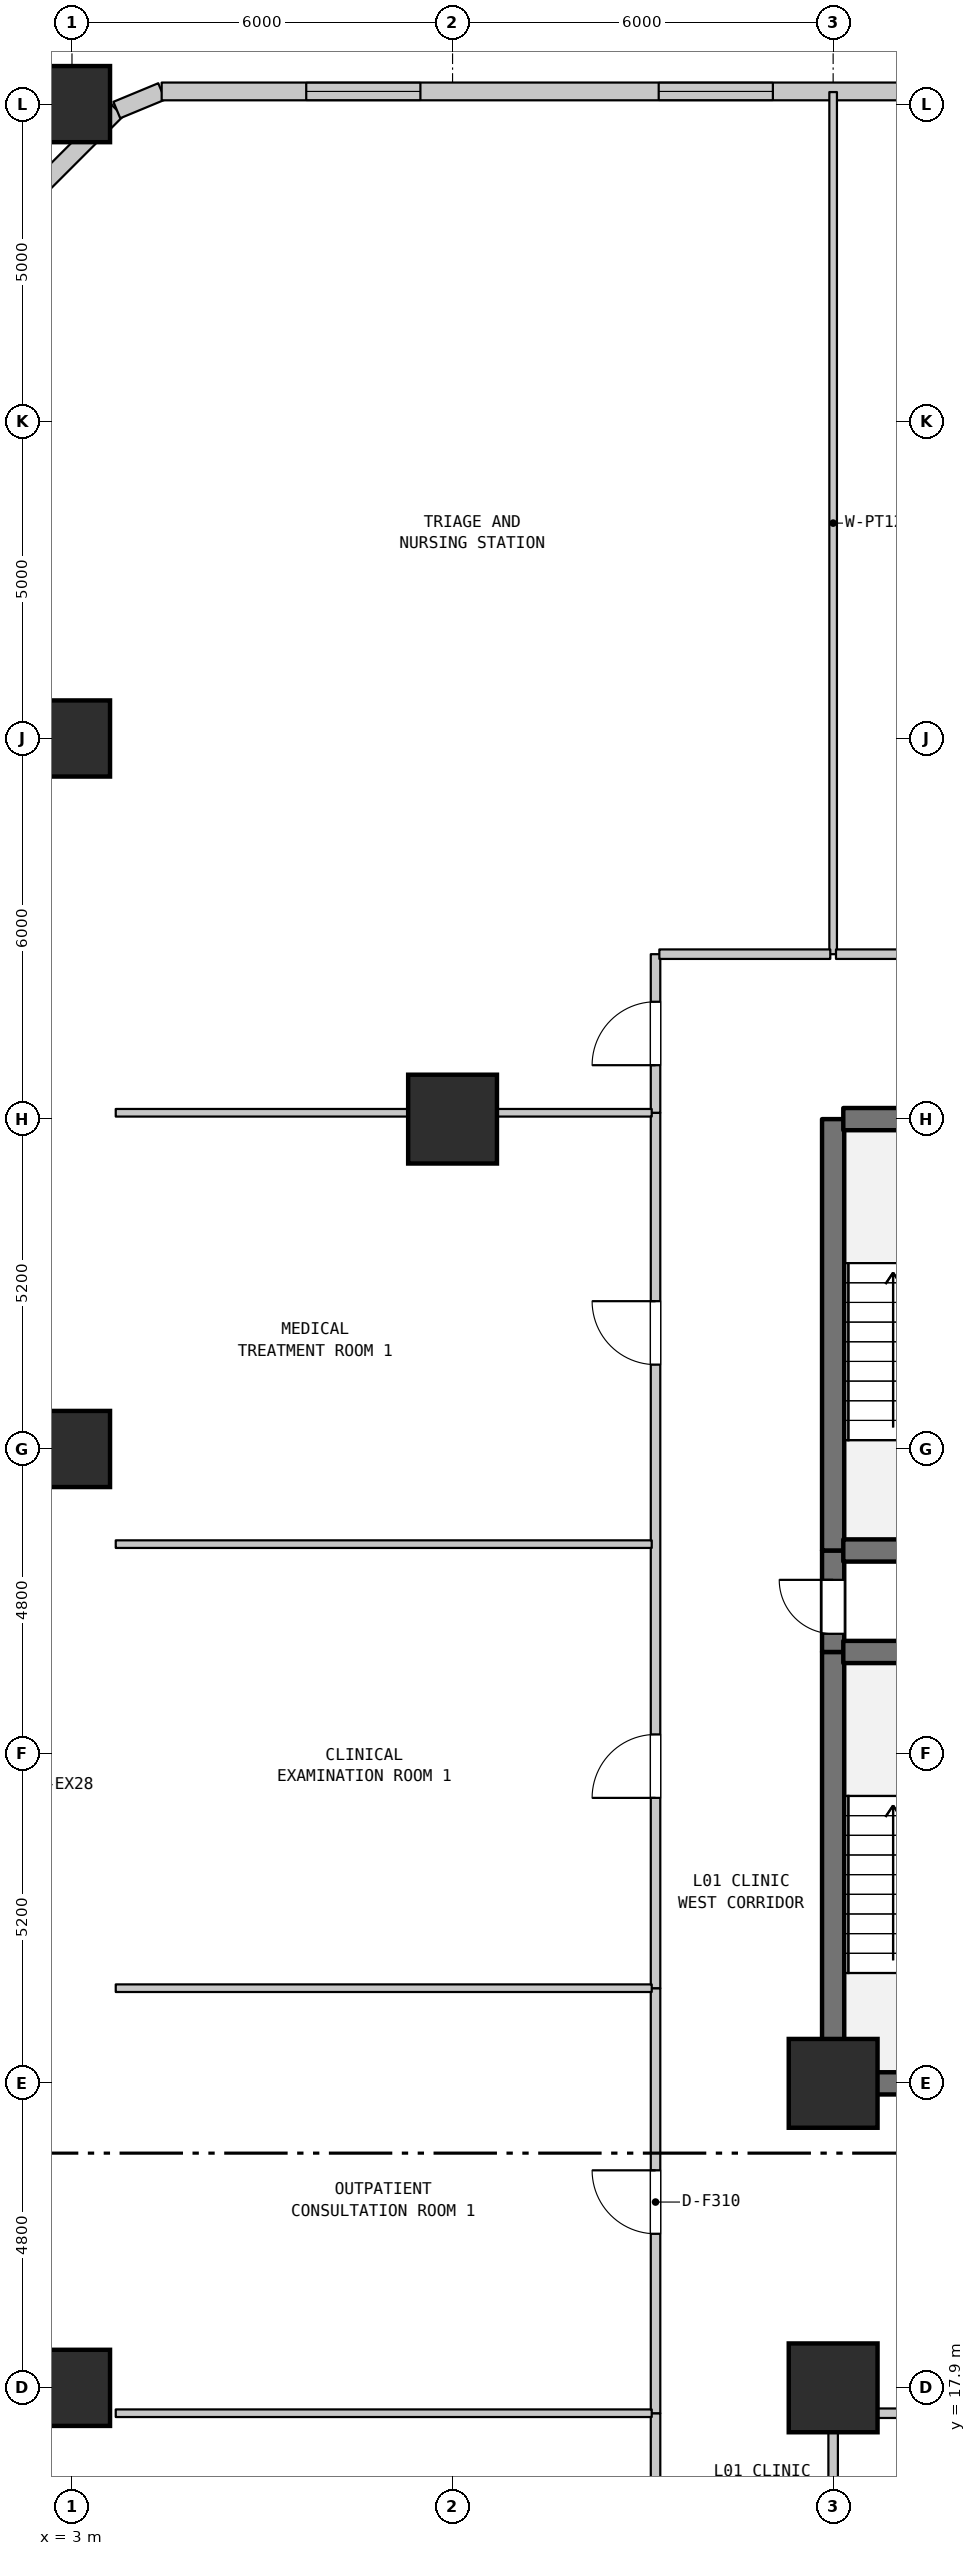
"""IFC4 building model, lengths in metres.
Left out: names, types, materials, properties, quantities, classifications, styles, units other than length and angle.
Written with IfcOpenShell. Run it as: python <this file> out.ifc"""

import sys

from ifc_helpers import new_model, si_unit, direction, frame, frame_2d, origin, origin_2d, place, context, subcontext, project, spatial, rectangle, extrude, element, fill, save


model = new_model("IFC4")
c1 = context("Model", 3, precision=1e-05, world=origin(), true_north=direction((0.0, 1.0)))
c2 = subcontext(c1, "Body", "Model", "MODEL_VIEW")
j1 = project(units=[si_unit("LENGTHUNIT", "METRE"), si_unit("PLANEANGLEUNIT", "RADIAN")], contexts=[c1])
p1 = place(None, origin())
s1 = spatial("IfcSite", under=j1, at=p1, CompositionType="ELEMENT")
p2 = place(p1, origin())
s2 = spatial("IfcBuilding", under=s1, at=p2, CompositionType="ELEMENT")
p3 = place(p2, frame((0.0, 0.0, 6.5)))
s3 = spatial("IfcBuildingStorey", under=s2, at=p3, CompositionType="ELEMENT", Elevation=6.5)
for number, where, z_axis, x_axis in (
    (1, (3.0, 17.9, 0.0), (0.0, 0.0, 1.0), (1.0, 0.0, 0.0)),
    (2, (3.0, 32.7, 0.0), (0.0, 0.0, 1.0), (1.0, 0.0, 0.0)),
    (3, (3.0, 43.9, 0.0), (0.0, 0.0, 1.0), (1.0, 0.0, 0.0)),
    (4, (3.0, 53.9, 0.0), (0.0, 0.0, 1.0), (1.0, 0.0, 0.0)),
):
    element("IfcColumn", number, at=place(p3, frame(where, z_axis=z_axis, x_axis=x_axis)), inside=s3, PredefinedType="PILASTER", context=c2, shape_type="SweptSolid", body=[
        extrude(rectangle(XDim=1.2, YDim=1.2, at=origin_2d()), origin(), (0.0, 0.0, 1.0), 6.5),
    ])
for number, where, z_axis, x_axis in (
    (5, (9.0, 37.9, 0.0), (0.0, 0.0, 1.0), (1.0, 0.0, 0.0)),
    (6, (15.0, 17.9, 0.0), (0.0, 0.0, 1.0), (1.0, 0.0, 0.0)),
    (7, (15.0, 22.7, 0.0), (0.0, 0.0, 1.0), (1.0, 0.0, 0.0)),
):
    element("IfcColumn", number, at=place(p3, frame(where, z_axis=z_axis, x_axis=x_axis)), inside=s3, PredefinedType="COLUMN", context=c2, shape_type="SweptSolid", body=[
        extrude(rectangle(XDim=1.4, YDim=1.4, at=origin_2d()), origin(), (0.0, 0.0, 1.0), 6.5),
    ])
p4 = place(p3, frame((2.293, 52.393, 0.0), z_axis=(0.0, 0.0, 1.0), x_axis=(0.707167825498, 0.707045731605, 0.0)))
e8 = element("IfcWall", 8, at=p4, inside=s3, PredefinedType="STANDARD", context=c2, shape_type="SweptSolid", body=[
    extrude(rectangle(XDim=2.0, YDim=0.28, at=frame_2d((1.0, 0.0))), origin(), (0.0, 0.0, 1.0), 6.17),
])
p5 = place(p3, frame((3.707, 53.807, 0.0), z_axis=(0.0, 0.0, 1.0), x_axis=(0.923717339373, 0.383074766777, 0.0)))
e9 = element("IfcWall", 9, at=p5, inside=s3, PredefinedType="STANDARD", context=c2, shape_type="SweptSolid", body=[
    extrude(rectangle(XDim=0.765, YDim=0.28, at=frame_2d((0.383, 0.0))), origin(), (0.0, 0.0, 1.0), 6.17),
])
p6 = place(p3, frame((4.414, 54.1, 0.0), z_axis=(0.0, 0.0, 1.0), x_axis=(1.0, 0.0, 0.0)))
e10 = element("IfcWall", 10, at=p6, inside=s3, PredefinedType="STANDARD", context=c2, shape_type="SweptSolid", body=[
    extrude(rectangle(XDim=28.586, YDim=0.28, at=frame_2d((14.293, 0.0))), origin(), (0.0, 0.0, 1.0), 6.17),
])
p7 = place(p6, frame((2.279, 0.0, 0.95)))
e11 = element("IfcOpeningElement", 11, at=p7, cuts=e10, PredefinedType="OPENING", context=c2, shape_type="SweptSolid", body=[
    extrude(rectangle(XDim=1.8, YDim=1.8, at=frame_2d((0.9, 0.9))), frame((0.0, 0.15, 0.0), z_axis=(0.0, -1.0, 0.0), x_axis=(1.0, 0.0, 0.0)), (0.0, 0.0, 1.0), 0.3),
])
p8 = place(p6, frame((7.836, 0.0, 0.95)))
e12 = element("IfcOpeningElement", 12, at=p8, cuts=e10, PredefinedType="OPENING", context=c2, shape_type="SweptSolid", body=[
    extrude(rectangle(XDim=1.8, YDim=1.8, at=frame_2d((0.9, 0.9))), frame((0.0, 0.15, 0.0), z_axis=(0.0, -1.0, 0.0), x_axis=(1.0, 0.0, 0.0)), (0.0, 0.0, 1.0), 0.3),
])
p9 = place(p6, frame((13.393, 0.0, 0.95)))
e13 = element("IfcOpeningElement", 13, at=p9, cuts=e10, PredefinedType="OPENING", context=c2, shape_type="SweptSolid", body=[
    extrude(rectangle(XDim=1.8, YDim=1.8, at=frame_2d((0.9, 0.9))), frame((0.0, 0.15, 0.0), z_axis=(0.0, -1.0, 0.0), x_axis=(1.0, 0.0, 0.0)), (0.0, 0.0, 1.0), 0.3),
])
p10 = place(p6, frame((18.95, 0.0, 0.95)))
e14 = element("IfcOpeningElement", 14, at=p10, cuts=e10, PredefinedType="OPENING", context=c2, shape_type="SweptSolid", body=[
    extrude(rectangle(XDim=1.8, YDim=1.8, at=frame_2d((0.9, 0.9))), frame((0.0, 0.15, 0.0), z_axis=(0.0, -1.0, 0.0), x_axis=(1.0, 0.0, 0.0)), (0.0, 0.0, 1.0), 0.3),
])
p11 = place(p6, frame((24.507, 0.0, 0.95)))
e15 = element("IfcOpeningElement", 15, at=p11, cuts=e10, PredefinedType="OPENING", context=c2, shape_type="SweptSolid", body=[
    extrude(rectangle(XDim=1.8, YDim=1.8, at=frame_2d((0.9, 0.9))), frame((0.0, 0.15, 0.0), z_axis=(0.0, -1.0, 0.0), x_axis=(1.0, 0.0, 0.0)), (0.0, 0.0, 1.0), 0.3),
])
p12 = place(p3, frame((12.2, 12.7, 0.0), z_axis=(0.0, 0.0, 1.0), x_axis=(0.0, 1.0, 0.0)))
e16 = element("IfcWall", 16, at=p12, inside=s3, PredefinedType="STANDARD", context=c2, shape_type="SweptSolid", body=[
    extrude(rectangle(XDim=4.8, YDim=0.15, at=frame_2d((2.4, 0.0))), origin(), (0.0, 0.0, 1.0), 6.17),
])
p13 = place(p12, frame((1.529, 0.0, 0.0)))
e17 = element("IfcOpeningElement", 17, at=p13, cuts=e16, PredefinedType="OPENING", context=c2, shape_type="SweptSolid", body=[
    extrude(rectangle(XDim=1.45, YDim=2.2, at=frame_2d((0.725, 1.1))), frame((0.0, 0.085, 0.0), z_axis=(0.0, -1.0, 0.0), x_axis=(1.0, 0.0, 0.0)), (0.0, 0.0, 1.0), 0.17),
])
p14 = place(p3, frame((12.2, 17.5, 0.0), z_axis=(0.0, 0.0, 1.0), x_axis=(0.0, 1.0, 0.0)))
e18 = element("IfcWall", 18, at=p14, inside=s3, PredefinedType="STANDARD", context=c2, shape_type="SweptSolid", body=[
    extrude(rectangle(XDim=6.7, YDim=0.15, at=frame_2d((3.35, 0.0))), origin(), (0.0, 0.0, 1.0), 6.17),
])
p15 = place(p14, frame((2.829, 0.0, 0.0)))
e19 = element("IfcOpeningElement", 19, at=p15, cuts=e18, PredefinedType="OPENING", context=c2, shape_type="SweptSolid", body=[
    extrude(rectangle(XDim=1.0, YDim=2.15, at=frame_2d((0.5, 1.075))), frame((0.0, 0.085, 0.0), z_axis=(0.0, -1.0, 0.0), x_axis=(1.0, 0.0, 0.0)), (0.0, 0.0, 1.0), 0.17),
])
p16 = place(p3, frame((12.2, 24.2, 0.0), z_axis=(0.0, 0.0, 1.0), x_axis=(0.0, 1.0, 0.0)))
e20 = element("IfcWall", 20, at=p16, inside=s3, PredefinedType="STANDARD", context=c2, shape_type="SweptSolid", body=[
    extrude(rectangle(XDim=13.8, YDim=0.15, at=frame_2d((6.9, 0.0))), origin(), (0.0, 0.0, 1.0), 6.17),
])
p17 = place(p16, frame((3.0, 0.0, 0.0)))
e21 = element("IfcOpeningElement", 21, at=p17, cuts=e20, PredefinedType="OPENING", context=c2, shape_type="SweptSolid", body=[
    extrude(rectangle(XDim=1.0, YDim=2.15, at=frame_2d((0.5, 1.075))), frame((0.0, 0.085, 0.0), z_axis=(0.0, -1.0, 0.0), x_axis=(1.0, 0.0, 0.0)), (0.0, 0.0, 1.0), 0.17),
])
p18 = place(p16, frame((9.83, 0.0, 0.0)))
e22 = element("IfcOpeningElement", 22, at=p18, cuts=e20, PredefinedType="OPENING", context=c2, shape_type="SweptSolid", body=[
    extrude(rectangle(XDim=1.0, YDim=2.15, at=frame_2d((0.5, 1.075))), frame((0.0, 0.085, 0.0), z_axis=(0.0, -1.0, 0.0), x_axis=(1.0, 0.0, 0.0)), (0.0, 0.0, 1.0), 0.17),
])
p19 = place(p3, frame((12.2, 38.0, 0.0), z_axis=(0.0, 0.0, 1.0), x_axis=(0.0, 1.0, 0.0)))
e23 = element("IfcWall", 23, at=p19, inside=s3, PredefinedType="STANDARD", context=c2, shape_type="SweptSolid", body=[
    extrude(rectangle(XDim=2.5, YDim=0.15, at=frame_2d((1.25, 0.0))), origin(), (0.0, 0.0, 1.0), 6.17),
])
p20 = place(p19, frame((0.75, 0.0, 0.0)))
e24 = element("IfcOpeningElement", 24, at=p20, cuts=e23, PredefinedType="OPENING", context=c2, shape_type="SweptSolid", body=[
    extrude(rectangle(XDim=1.0, YDim=2.15, at=frame_2d((0.5, 1.075))), frame((0.0, 0.085, 0.0), z_axis=(0.0, -1.0, 0.0), x_axis=(1.0, 0.0, 0.0)), (0.0, 0.0, 1.0), 0.17),
])
p21 = place(p3, frame((15.0, 12.7, 0.0), z_axis=(0.0, 0.0, 1.0), x_axis=(0.0, 1.0, 0.0)))
e25 = element("IfcWall", 25, at=p21, inside=s3, PredefinedType="STANDARD", context=c2, shape_type="SweptSolid", body=[
    extrude(rectangle(XDim=4.8, YDim=0.15, at=frame_2d((2.4, 0.0))), origin(), (0.0, 0.0, 1.0), 5.67),
])
p22 = place(p3, frame((15.0, 22.7, 0.0), z_axis=(0.0, 0.0, 1.0), x_axis=(0.0, 1.0, 0.0)))
e26 = element("IfcWall", 26, at=p22, inside=s3, PredefinedType="SHEAR", context=c2, shape_type="SweptSolid", body=[
    extrude(rectangle(XDim=6.8, YDim=0.35, at=frame_2d((3.4, 0.0))), origin(), (0.0, 0.0, 1.0), 6.17),
])
p23 = place(p3, frame((15.0, 29.5, 0.0), z_axis=(0.0, 0.0, 1.0), x_axis=(0.0, 1.0, 0.0)))
e27 = element("IfcWall", 27, at=p23, inside=s3, PredefinedType="SHEAR", context=c2, shape_type="SweptSolid", body=[
    extrude(rectangle(XDim=1.6, YDim=0.35, at=frame_2d((0.8, 0.0))), origin(), (0.0, 0.0, 1.0), 6.17),
])
p24 = place(p23, frame((0.287, 0.0, 0.0)))
e28 = element("IfcOpeningElement", 28, at=p24, cuts=e27, PredefinedType="OPENING", context=c2, shape_type="SweptSolid", body=[
    extrude(rectangle(XDim=0.85, YDim=2.1, at=frame_2d((0.425, 1.05))), frame((0.0, 0.185, 0.0), z_axis=(0.0, -1.0, 0.0), x_axis=(1.0, 0.0, 0.0)), (0.0, 0.0, 1.0), 0.37),
])
p25 = place(p3, frame((15.0, 31.1, 0.0), z_axis=(0.0, 0.0, 1.0), x_axis=(0.0, 1.0, 0.0)))
e29 = element("IfcWall", 29, at=p25, inside=s3, PredefinedType="SHEAR", context=c2, shape_type="SweptSolid", body=[
    extrude(rectangle(XDim=6.8, YDim=0.35, at=frame_2d((3.4, 0.0))), origin(), (0.0, 0.0, 1.0), 6.17),
])
p26 = place(p3, frame((15.0, 40.5, 0.0), z_axis=(0.0, 0.0, 1.0), x_axis=(0.0, 1.0, 0.0)))
e30 = element("IfcWall", 30, at=p26, inside=s3, PredefinedType="PARTITIONING", context=c2, shape_type="SweptSolid", body=[
    extrude(rectangle(XDim=13.59, YDim=0.12, at=frame_2d((6.795, 0.0))), origin(), (0.0, 0.0, 1.0), 6.17),
])
p27 = place(p3, frame((3.69, 17.5, 0.0), z_axis=(0.0, 0.0, 1.0), x_axis=(1.0, 0.0, 0.0)))
e31 = element("IfcWall", 31, at=p27, inside=s3, PredefinedType="PARTITIONING", context=c2, shape_type="SweptSolid", body=[
    extrude(rectangle(XDim=8.45, YDim=0.12, at=frame_2d((4.225, 0.0))), origin(), (0.0, 0.0, 1.0), 6.17),
])
p28 = place(p3, frame((15.06, 17.5, 0.0), z_axis=(0.0, 0.0, 1.0), x_axis=(1.0, 0.0, 0.0)))
e32 = element("IfcWall", 32, at=p28, inside=s3, PredefinedType="STANDARD", context=c2, shape_type="SweptSolid", body=[
    extrude(rectangle(XDim=8.295, YDim=0.15, at=frame_2d((4.147, 0.0))), origin(), (0.0, 0.0, 1.0), 6.17),
])
p29 = place(p28, frame((1.665, 0.0, 0.0)))
e33 = element("IfcOpeningElement", 33, at=p29, cuts=e32, PredefinedType="OPENING", context=c2, shape_type="SweptSolid", body=[
    extrude(rectangle(XDim=0.9, YDim=2.1, at=frame_2d((0.45, 1.05))), frame((0.0, 0.085, 0.0), z_axis=(0.0, -1.0, 0.0), x_axis=(1.0, 0.0, 0.0)), (0.0, 0.0, 1.0), 0.17),
])
p30 = place(p28, frame((5.715, 0.0, 0.0)))
e34 = element("IfcOpeningElement", 34, at=p30, cuts=e32, PredefinedType="OPENING", context=c2, shape_type="SweptSolid", body=[
    extrude(rectangle(XDim=0.9, YDim=2.1, at=frame_2d((0.45, 1.05))), frame((0.0, 0.085, 0.0), z_axis=(0.0, -1.0, 0.0), x_axis=(1.0, 0.0, 0.0)), (0.0, 0.0, 1.0), 0.17),
])
p31 = place(p3, frame((15.16, 22.7, 0.0), z_axis=(0.0, 0.0, 1.0), x_axis=(1.0, 0.0, 0.0)))
e35 = element("IfcWall", 35, at=p31, inside=s3, PredefinedType="SHEAR", context=c2, shape_type="SweptSolid", body=[
    extrude(rectangle(XDim=3.68, YDim=0.35, at=frame_2d((1.84, 0.0))), origin(), (0.0, 0.0, 1.0), 6.17),
])
p32 = place(p3, frame((3.69, 24.2, 0.0), z_axis=(0.0, 0.0, 1.0), x_axis=(1.0, 0.0, 0.0)))
e36 = element("IfcWall", 36, at=p32, inside=s3, PredefinedType="PARTITIONING", context=c2, shape_type="SweptSolid", body=[
    extrude(rectangle(XDim=8.45, YDim=0.12, at=frame_2d((4.225, 0.0))), origin(), (0.0, 0.0, 1.0), 6.17),
])
for number, where, z_axis, x_axis in (
    (37, (15.16, 29.5, 0.0), (0.0, 0.0, 1.0), (1.0, 0.0, 0.0)),
    (38, (15.16, 31.1, 0.0), (0.0, 0.0, 1.0), (1.0, 0.0, 0.0)),
):
    element("IfcWall", number, at=place(p3, frame(where, z_axis=z_axis, x_axis=x_axis)), inside=s3, PredefinedType="SHEAR", context=c2, shape_type="SweptSolid", body=[
        extrude(rectangle(XDim=3.68, YDim=0.35, at=frame_2d((1.84, 0.0))), origin(), (0.0, 0.0, 1.0), 6.17),
    ])
p33 = place(p3, frame((3.69, 31.2, 0.0), z_axis=(0.0, 0.0, 1.0), x_axis=(1.0, 0.0, 0.0)))
e39 = element("IfcWall", 39, at=p33, inside=s3, PredefinedType="PARTITIONING", context=c2, shape_type="SweptSolid", body=[
    extrude(rectangle(XDim=8.45, YDim=0.12, at=frame_2d((4.225, 0.0))), origin(), (0.0, 0.0, 1.0), 6.17),
])
p34 = place(p3, frame((15.16, 37.9, 0.0), z_axis=(0.0, 0.0, 1.0), x_axis=(1.0, 0.0, 0.0)))
e40 = element("IfcWall", 40, at=p34, inside=s3, PredefinedType="SHEAR", context=c2, shape_type="SweptSolid", body=[
    extrude(rectangle(XDim=3.68, YDim=0.35, at=frame_2d((1.84, 0.0))), origin(), (0.0, 0.0, 1.0), 6.17),
])
p35 = place(p3, frame((3.69, 38.0, 0.0), z_axis=(0.0, 0.0, 1.0), x_axis=(1.0, 0.0, 0.0)))
e41 = element("IfcWall", 41, at=p35, inside=s3, PredefinedType="PARTITIONING", context=c2, shape_type="SweptSolid", body=[
    extrude(rectangle(XDim=8.45, YDim=0.12, at=frame_2d((4.225, 0.0))), origin(), (0.0, 0.0, 1.0), 6.17),
])
p36 = place(p3, frame((12.26, 40.5, 0.0), z_axis=(0.0, 0.0, 1.0), x_axis=(1.0, 0.0, 0.0)))
e42 = element("IfcWall", 42, at=p36, inside=s3, PredefinedType="STANDARD", context=c2, shape_type="SweptSolid", body=[
    extrude(rectangle(XDim=2.695, YDim=0.15, at=frame_2d((1.348, 0.0))), origin(), (0.0, 0.0, 1.0), 6.17),
])
p37 = place(p3, frame((15.045, 40.5, 0.0), z_axis=(0.0, 0.0, 1.0), x_axis=(1.0, 0.0, 0.0)))
e43 = element("IfcWall", 43, at=p37, inside=s3, PredefinedType="STANDARD", context=c2, shape_type="SweptSolid", body=[
    extrude(rectangle(XDim=17.065, YDim=0.15, at=frame_2d((8.533, 0.0))), origin(), (0.0, 0.0, 1.0), 6.17),
])
p38 = place(p37, frame((2.805, 0.0, 0.0)))
e44 = element("IfcOpeningElement", 44, at=p38, cuts=e43, PredefinedType="OPENING", context=c2, shape_type="SweptSolid", body=[
    extrude(rectangle(XDim=1.0, YDim=2.15, at=frame_2d((0.5, 1.075))), frame((0.0, 0.085, 0.0), z_axis=(0.0, -1.0, 0.0), x_axis=(1.0, 0.0, 0.0)), (0.0, 0.0, 1.0), 0.17),
])
p39 = place(p37, frame((8.883, 0.0, 0.0)))
e45 = element("IfcOpeningElement", 45, at=p39, cuts=e43, PredefinedType="OPENING", context=c2, shape_type="SweptSolid", body=[
    extrude(rectangle(XDim=1.0, YDim=2.15, at=frame_2d((0.5, 1.075))), frame((0.0, 0.085, 0.0), z_axis=(0.0, -1.0, 0.0), x_axis=(1.0, 0.0, 0.0)), (0.0, 0.0, 1.0), 0.17),
])
p40 = place(p37, frame((14.265, 0.0, 0.0)))
e46 = element("IfcOpeningElement", 46, at=p40, cuts=e43, PredefinedType="OPENING", context=c2, shape_type="SweptSolid", body=[
    extrude(rectangle(XDim=1.0, YDim=2.15, at=frame_2d((0.5, 1.075))), frame((0.0, 0.085, 0.0), z_axis=(0.0, -1.0, 0.0), x_axis=(1.0, 0.0, 0.0)), (0.0, 0.0, 1.0), 0.17),
])
p41 = place(p7, origin())
e47 = element("IfcWindow", 47, at=p41, inside=s3, PartitioningType="DOUBLE_PANEL_VERTICAL", PredefinedType="WINDOW", context=c2, shape_type="SweptSolid", body=[
    extrude(rectangle(XDim=1.8, YDim=1.8, at=frame_2d((0.9, 0.9))), frame((0.0, 0.03, 0.0), z_axis=(0.0, -1.0, 0.0), x_axis=(1.0, 0.0, 0.0)), (0.0, 0.0, 1.0), 0.06),
])
fill(e11, e47)
p42 = place(p8, origin())
e48 = element("IfcWindow", 48, at=p42, inside=s3, PartitioningType="DOUBLE_PANEL_VERTICAL", PredefinedType="WINDOW", context=c2, shape_type="SweptSolid", body=[
    extrude(rectangle(XDim=1.8, YDim=1.8, at=frame_2d((0.9, 0.9))), frame((0.0, 0.03, 0.0), z_axis=(0.0, -1.0, 0.0), x_axis=(1.0, 0.0, 0.0)), (0.0, 0.0, 1.0), 0.06),
])
fill(e12, e48)
p43 = place(p15, origin())
e49 = element("IfcDoor", 49, at=p43, inside=s3, OperationType="SINGLE_SWING_RIGHT", PredefinedType="DOOR", context=c2, shape_type="SweptSolid", body=[
    extrude(rectangle(XDim=1.0, YDim=2.15, at=frame_2d((0.5, 1.075))), frame((0.0, 0.025, 0.0), z_axis=(0.0, -1.0, 0.0), x_axis=(1.0, 0.0, 0.0)), (0.0, 0.0, 1.0), 0.05),
])
fill(e19, e49)
p44 = place(p17, origin())
e50 = element("IfcDoor", 50, at=p44, inside=s3, OperationType="SINGLE_SWING_LEFT", PredefinedType="DOOR", context=c2, shape_type="SweptSolid", body=[
    extrude(rectangle(XDim=1.0, YDim=2.15, at=frame_2d((0.5, 1.075))), frame((0.0, 0.025, 0.0), z_axis=(0.0, -1.0, 0.0), x_axis=(1.0, 0.0, 0.0)), (0.0, 0.0, 1.0), 0.05),
])
fill(e21, e50)
p45 = place(p18, origin())
e51 = element("IfcDoor", 51, at=p45, inside=s3, OperationType="SINGLE_SWING_RIGHT", PredefinedType="DOOR", context=c2, shape_type="SweptSolid", body=[
    extrude(rectangle(XDim=1.0, YDim=2.15, at=frame_2d((0.5, 1.075))), frame((0.0, 0.025, 0.0), z_axis=(0.0, -1.0, 0.0), x_axis=(1.0, 0.0, 0.0)), (0.0, 0.0, 1.0), 0.05),
])
fill(e22, e51)
p46 = place(p20, origin())
e52 = element("IfcDoor", 52, at=p46, inside=s3, OperationType="SINGLE_SWING_LEFT", PredefinedType="DOOR", context=c2, shape_type="SweptSolid", body=[
    extrude(rectangle(XDim=1.0, YDim=2.15, at=frame_2d((0.5, 1.075))), frame((0.0, 0.025, 0.0), z_axis=(0.0, -1.0, 0.0), x_axis=(1.0, 0.0, 0.0)), (0.0, 0.0, 1.0), 0.05),
])
fill(e24, e52)
p47 = place(p24, origin())
e53 = element("IfcDoor", 53, at=p47, inside=s3, OperationType="SINGLE_SWING_RIGHT", PredefinedType="DOOR", context=c2, shape_type="SweptSolid", body=[
    extrude(rectangle(XDim=0.85, YDim=2.1, at=frame_2d((0.425, 1.05))), frame((0.0, 0.025, 0.0), z_axis=(0.0, -1.0, 0.0), x_axis=(1.0, 0.0, 0.0)), (0.0, 0.0, 1.0), 0.05),
])
fill(e28, e53)
save(model, sys.argv[1])
